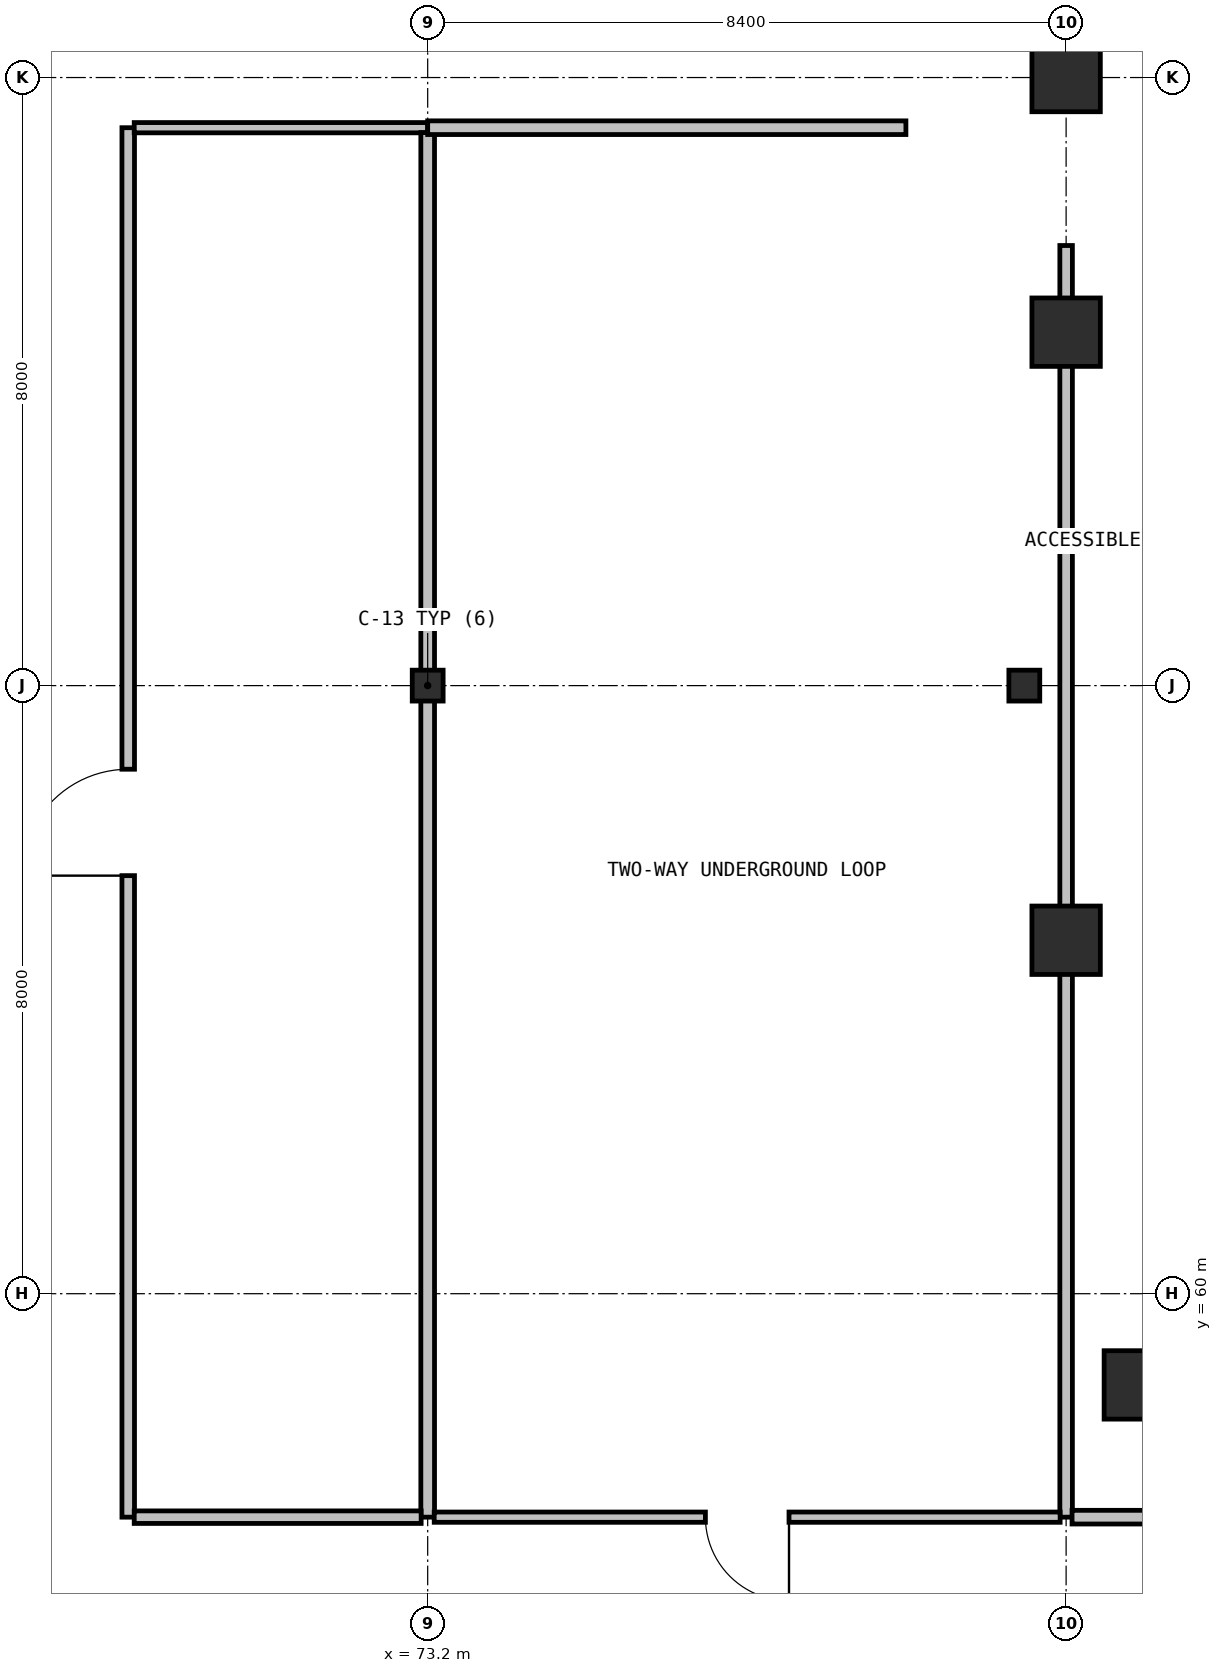
"""IFC4 building model, lengths in metres.
Left out: names, types, materials, properties, quantities, classifications, styles, units other than length and angle.
Written with IfcOpenShell. Run it as: python <this file> out.ifc"""

import sys

from ifc_helpers import new_model, si_unit, direction, frame, frame_2d, origin, origin_2d, place, context, subcontext, project, spatial, rectangle, hollow_circle, extrude, element, fill, save


model = new_model("IFC4")
c1 = context("Model", 3, precision=1e-05, world=origin(), true_north=direction((0.0, 1.0)))
c2 = subcontext(c1, "Body", "Model", "MODEL_VIEW")
j1 = project(units=[si_unit("LENGTHUNIT", "METRE"), si_unit("PLANEANGLEUNIT", "RADIAN")], contexts=[c1])
p1 = place(None, origin())
s1 = spatial("IfcSite", under=j1, at=p1, CompositionType="ELEMENT")
p2 = place(p1, origin())
s2 = spatial("IfcBuilding", under=s1, at=p2, CompositionType="ELEMENT")
p3 = place(p2, frame((0.0, 0.0, -4.8)))
s3 = spatial("IfcBuildingStorey", under=s2, at=p3, CompositionType="ELEMENT", Elevation=-4.8)
for number, where, z_axis, x_axis in (
    (1, (73.2, 68.0, 0.0), (0.0, 0.0, 1.0), (1.0, 0.0, 0.0)),
    (2, (81.05, 68.0, 0.0), (0.0, 0.0, 1.0), (1.0, 0.0, 0.0)),
):
    element("IfcColumn", number, at=place(p3, frame(where, z_axis=z_axis, x_axis=x_axis)), inside=s3, PredefinedType="COLUMN", context=c2, shape_type="SweptSolid", body=[
        extrude(hollow_circle(Radius=0.203, WallThickness=0.016, at=origin_2d()), origin(), (0.0, 0.0, 1.0), 4.8),
    ])
p4 = place(p3, frame((82.55, 58.8, 0.0), z_axis=(0.0, 0.0, 1.0), x_axis=(1.0, 0.0, 0.0)))
e3 = element("IfcColumn", 3, at=p4, inside=s3, PredefinedType="COLUMN", context=c2, shape_type="SweptSolid", body=[
    extrude(rectangle(XDim=0.9, YDim=0.9, at=origin_2d()), origin(), (0.0, 0.0, 1.0), 4.8),
])
for number, where, z_axis, x_axis in (
    (4, (81.6, 64.65, 0.0), (0.0, 0.0, 1.0), (1.0, 0.0, 0.0)),
    (5, (81.6, 72.65, 0.0), (0.0, 0.0, 1.0), (1.0, 0.0, 0.0)),
    (6, (81.6, 76.0, 0.0), (0.0, 0.0, 1.0), (1.0, 0.0, 0.0)),
):
    element("IfcColumn", number, at=place(p3, frame(where, z_axis=z_axis, x_axis=x_axis)), inside=s3, PredefinedType="COLUMN", context=c2, shape_type="SweptSolid", body=[
        extrude(rectangle(XDim=0.9, YDim=0.9, at=origin_2d()), origin(), (0.0, 0.0, 1.0), 4.45),
    ])
p5 = place(p3, frame((69.26, 57.06, 0.0), z_axis=(0.0, 0.0, 1.0), x_axis=(0.0, 1.0, 0.0)))
e7 = element("IfcWall", 7, at=p5, inside=s3, PredefinedType="PARTITIONING", context=c2, shape_type="SweptSolid", body=[
    extrude(rectangle(XDim=18.28, YDim=0.165, at=frame_2d((9.14, 0.0))), origin(), (0.0, 0.0, 1.0), 4.45),
])
p6 = place(p5, frame((8.44, 0.0, 0.0)))
e8 = element("IfcOpeningElement", 8, at=p6, cuts=e7, PredefinedType="OPENING", context=c2, shape_type="SweptSolid", body=[
    extrude(rectangle(XDim=1.4, YDim=2.15, at=frame_2d((0.7, 1.075))), frame((0.0, 0.093, 0.0), z_axis=(0.0, -1.0, 0.0), x_axis=(1.0, 0.0, 0.0)), (0.0, 0.0, 1.0), 0.185),
])
p7 = place(p3, frame((69.339, 75.34, 0.0), z_axis=(0.0, 0.0, 1.0), x_axis=(1.0, 0.0, 0.0)))
e9 = element("IfcWall", 9, at=p7, inside=s3, PredefinedType="PARTITIONING", context=c2, shape_type="SweptSolid", body=[
    extrude(rectangle(XDim=3.861, YDim=0.135, at=frame_2d((1.93, 0.0))), origin(), (0.0, 0.0, 1.0), 4.45),
])
p8 = place(p3, frame((73.2, 75.276, 0.0), z_axis=(0.0, 0.0, 1.0), x_axis=(0.0, -1.0, 0.0)))
e10 = element("IfcWall", 10, at=p8, inside=s3, PredefinedType="PARTITIONING", context=c2, shape_type="SweptSolid", body=[
    extrude(rectangle(XDim=18.216, YDim=0.18, at=frame_2d((9.108, 0.0))), origin(), (0.0, 0.0, 1.0), 3.7),
])
p9 = place(p3, frame((73.114, 57.06, 0.0), z_axis=(0.0, 0.0, 1.0), x_axis=(-1.0, 0.0, 0.0)))
e11 = element("IfcWall", 11, at=p9, inside=s3, PredefinedType="PARTITIONING", context=c2, shape_type="SweptSolid", body=[
    extrude(rectangle(XDim=3.775, YDim=0.165, at=frame_2d((1.887, 0.0))), origin(), (0.0, 0.0, 1.0), 4.45),
])
p10 = place(p3, frame((81.6, 73.79, 0.0), z_axis=(0.0, 0.0, 1.0), x_axis=(0.0, -1.0, 0.0)))
e12 = element("IfcWall", 12, at=p10, inside=s3, PredefinedType="PARTITIONING", context=c2, shape_type="SweptSolid", body=[
    extrude(rectangle(XDim=16.73, YDim=0.165, at=frame_2d((8.365, 0.0))), origin(), (0.0, 0.0, 1.0), 4.45),
])
p11 = place(p3, frame((81.521, 57.06, 0.0), z_axis=(0.0, 0.0, 1.0), x_axis=(-1.0, 0.0, 0.0)))
e13 = element("IfcWall", 13, at=p11, inside=s3, PredefinedType="PARTITIONING", context=c2, shape_type="SweptSolid", body=[
    extrude(rectangle(XDim=8.235, YDim=0.135, at=frame_2d((4.118, 0.0))), origin(), (0.0, 0.0, 1.0), 4.45),
])
p12 = place(p11, frame((3.567, 0.0, 0.0)))
e14 = element("IfcOpeningElement", 14, at=p12, cuts=e13, PredefinedType="OPENING", context=c2, shape_type="SweptSolid", body=[
    extrude(rectangle(XDim=1.1, YDim=2.15, at=frame_2d((0.55, 1.075))), frame((0.0, 0.077, 0.0), z_axis=(0.0, -1.0, 0.0), x_axis=(1.0, 0.0, 0.0)), (0.0, 0.0, 1.0), 0.155),
])
p13 = place(p3, frame((73.2, 75.34, 0.0), z_axis=(0.0, 0.0, 1.0), x_axis=(1.0, 0.0, 0.0)))
e15 = element("IfcWall", 15, at=p13, inside=s3, PredefinedType="PARTITIONING", context=c2, shape_type="SweptSolid", body=[
    extrude(rectangle(XDim=6.292, YDim=0.18, at=frame_2d((3.146, 0.0))), origin(), (0.0, 0.0, 1.0), 4.45),
])
p14 = place(p3, frame((84.876, 57.06, 0.0), z_axis=(0.0, 0.0, 1.0), x_axis=(-1.0, 0.0, 0.0)))
e16 = element("IfcWall", 16, at=p14, inside=s3, PredefinedType="PARTITIONING", context=c2, shape_type="SweptSolid", body=[
    extrude(rectangle(XDim=3.198, YDim=0.18, at=frame_2d((1.599, 0.0))), origin(), (0.0, 0.0, 1.0), 4.45),
])
p15 = place(p14, frame((0.74, 0.0, 0.0)))
e17 = element("IfcOpeningElement", 17, at=p15, cuts=e16, PredefinedType="OPENING", context=c2, shape_type="SweptSolid", body=[
    extrude(rectangle(XDim=0.95, YDim=2.1, at=frame_2d((0.475, 1.05))), frame((0.0, 0.1, 0.0), z_axis=(0.0, -1.0, 0.0), x_axis=(1.0, 0.0, 0.0)), (0.0, 0.0, 1.0), 0.2),
])
p16 = place(p6, origin())
e18 = element("IfcDoor", 18, at=p16, inside=s3, OperationType="SINGLE_SWING_RIGHT", PredefinedType="DOOR", context=c2, shape_type="SweptSolid", body=[
    extrude(rectangle(XDim=1.4, YDim=2.15, at=frame_2d((0.7, 1.075))), frame((0.0, 0.025, 0.0), z_axis=(0.0, -1.0, 0.0), x_axis=(1.0, 0.0, 0.0)), (0.0, 0.0, 1.0), 0.05),
])
fill(e8, e18)
p17 = place(p12, origin())
e19 = element("IfcDoor", 19, at=p17, inside=s3, OperationType="SINGLE_SWING_LEFT", PredefinedType="DOOR", context=c2, shape_type="SweptSolid", body=[
    extrude(rectangle(XDim=1.1, YDim=2.15, at=frame_2d((0.55, 1.075))), frame((0.0, 0.025, 0.0), z_axis=(0.0, -1.0, 0.0), x_axis=(1.0, 0.0, 0.0)), (0.0, 0.0, 1.0), 0.05),
])
fill(e14, e19)
save(model, sys.argv[1])
